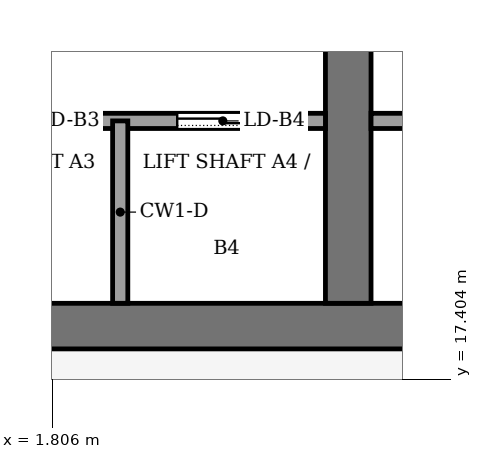
"""IFC4 building model, lengths in metres.
Left out: names, types, materials, properties, quantities, classifications, styles, units other than length and angle.
Written with IfcOpenShell. Run it as: python <this file> out.ifc"""

import sys

from ifc_helpers import new_model, si_unit, direction, frame, frame_2d, origin, place, context, subcontext, project, spatial, rectangle, extrude, element, fill, save


model = new_model("IFC4")
c1 = context("Model", 3, precision=1e-05, world=origin(), true_north=direction((0.0, 1.0)))
c2 = subcontext(c1, "Body", "Model", "MODEL_VIEW")
j1 = project(units=[si_unit("LENGTHUNIT", "METRE"), si_unit("PLANEANGLEUNIT", "RADIAN")], contexts=[c1])
p1 = place(None, origin())
s1 = spatial("IfcSite", under=j1, at=p1, CompositionType="ELEMENT")
p2 = place(p1, origin())
s2 = spatial("IfcBuilding", under=s1, at=p2, CompositionType="ELEMENT")
p3 = place(p2, frame((0.0, 0.0, 289.0)))
s3 = spatial("IfcBuildingStorey", under=s2, at=p3, CompositionType="ELEMENT", Elevation=289.0)
p4 = place(p3, frame((-13.2, 18.1, -0.13), z_axis=(0.0, 0.0, 1.0), x_axis=(1.0, 0.0, 0.0)))
e1 = element("IfcWall", 1, at=p4, inside=s3, PredefinedType="SHEAR", context=c2, shape_type="SweptSolid", body=[
    extrude(rectangle(XDim=26.4, YDim=0.6, at=frame_2d((13.2, 0.0))), origin(), (0.0, 0.0, 1.0), 5.0),
])
p5 = place(p3, frame((5.7, 18.4, -0.13), z_axis=(0.0, 0.0, 1.0), x_axis=(0.0, 1.0, 0.0)))
e2 = element("IfcWall", 2, at=p5, inside=s3, PredefinedType="SHEAR", context=c2, shape_type="SweptSolid", body=[
    extrude(rectangle(XDim=19.2, YDim=0.6, at=frame_2d((9.6, 0.0))), origin(), (0.0, 0.0, 1.0), 5.0),
])
p6 = place(p5, frame((13.3, 0.0, 0.13)))
e3 = element("IfcOpeningElement", 3, at=p6, cuts=e2, PredefinedType="OPENING", context=c2, shape_type="SweptSolid", body=[
    extrude(rectangle(XDim=2.4, YDim=2.4, at=frame_2d((1.2, 1.2))), frame((0.0, 0.31, 0.0), z_axis=(0.0, -1.0, 0.0), x_axis=(1.0, 0.0, 0.0)), (0.0, 0.0, 1.0), 0.62),
])
p7 = place(p3, frame((-5.4, 20.8, 0.0), z_axis=(0.0, 0.0, 1.0), x_axis=(1.0, 0.0, 0.0)))
e4 = element("IfcWall", 4, at=p7, inside=s3, PredefinedType="PARTITIONING", context=c2, shape_type="SweptSolid", body=[
    extrude(rectangle(XDim=10.8, YDim=0.2, at=frame_2d((5.4, 0.0))), origin(), (0.0, 0.0, 1.0), 4.87),
])
p8 = place(p7, frame((0.75, 0.0, 0.0)))
e5 = element("IfcOpeningElement", 5, at=p8, cuts=e4, PredefinedType="OPENING", context=c2, shape_type="SweptSolid", body=[
    extrude(rectangle(XDim=1.2, YDim=2.2, at=frame_2d((0.6, 1.1))), frame((0.0, 0.11, 0.0), z_axis=(0.0, -1.0, 0.0), x_axis=(1.0, 0.0, 0.0)), (0.0, 0.0, 1.0), 0.22),
])
p9 = place(p7, frame((3.45, 0.0, 0.0)))
e6 = element("IfcOpeningElement", 6, at=p9, cuts=e4, PredefinedType="OPENING", context=c2, shape_type="SweptSolid", body=[
    extrude(rectangle(XDim=1.2, YDim=2.2, at=frame_2d((0.6, 1.1))), frame((0.0, 0.11, 0.0), z_axis=(0.0, -1.0, 0.0), x_axis=(1.0, 0.0, 0.0)), (0.0, 0.0, 1.0), 0.22),
])
p10 = place(p7, frame((6.15, 0.0, 0.0)))
e7 = element("IfcOpeningElement", 7, at=p10, cuts=e4, PredefinedType="OPENING", context=c2, shape_type="SweptSolid", body=[
    extrude(rectangle(XDim=1.2, YDim=2.2, at=frame_2d((0.6, 1.1))), frame((0.0, 0.11, 0.0), z_axis=(0.0, -1.0, 0.0), x_axis=(1.0, 0.0, 0.0)), (0.0, 0.0, 1.0), 0.22),
])
p11 = place(p7, frame((8.85, 0.0, 0.0)))
e8 = element("IfcOpeningElement", 8, at=p11, cuts=e4, PredefinedType="OPENING", context=c2, shape_type="SweptSolid", body=[
    extrude(rectangle(XDim=1.2, YDim=2.2, at=frame_2d((0.6, 1.1))), frame((0.0, 0.11, 0.0), z_axis=(0.0, -1.0, 0.0), x_axis=(1.0, 0.0, 0.0)), (0.0, 0.0, 1.0), 0.22),
])
p12 = place(p3, frame((6.0, 20.8, 0.0), z_axis=(0.0, 0.0, 1.0), x_axis=(1.0, 0.0, 0.0)))
e9 = element("IfcWall", 9, at=p12, inside=s3, PredefinedType="PARTITIONING", context=c2, shape_type="SweptSolid", body=[
    extrude(rectangle(XDim=6.6, YDim=0.2, at=frame_2d((3.3, 0.0))), origin(), (0.0, 0.0, 1.0), 4.87),
])
p13 = place(p12, frame((1.15, 0.0, 0.0)))
e10 = element("IfcOpeningElement", 10, at=p13, cuts=e9, PredefinedType="OPENING", context=c2, shape_type="SweptSolid", body=[
    extrude(rectangle(XDim=1.0, YDim=2.1, at=frame_2d((0.5, 1.05))), frame((0.0, 0.11, 0.0), z_axis=(0.0, -1.0, 0.0), x_axis=(1.0, 0.0, 0.0)), (0.0, 0.0, 1.0), 0.22),
])
p14 = place(p12, frame((4.45, 0.0, 0.0)))
e11 = element("IfcOpeningElement", 11, at=p14, cuts=e9, PredefinedType="OPENING", context=c2, shape_type="SweptSolid", body=[
    extrude(rectangle(XDim=1.0, YDim=2.1, at=frame_2d((0.5, 1.05))), frame((0.0, 0.11, 0.0), z_axis=(0.0, -1.0, 0.0), x_axis=(1.0, 0.0, 0.0)), (0.0, 0.0, 1.0), 0.22),
])
p15 = place(p3, frame((2.7, 18.4, 0.0), z_axis=(0.0, 0.0, 1.0), x_axis=(0.0, 1.0, 0.0)))
e12 = element("IfcWall", 12, at=p15, inside=s3, PredefinedType="PARTITIONING", context=c2, shape_type="SweptSolid", body=[
    extrude(rectangle(XDim=2.4, YDim=0.2, at=frame_2d((1.2, 0.0))), origin(), (0.0, 0.0, 1.0), 4.87),
])
p16 = place(p10, origin())
e13 = element("IfcDoor", 13, at=p16, inside=s3, OperationType="SLIDING_TO_LEFT", PredefinedType="DOOR", context=c2, shape_type="SweptSolid", body=[
    extrude(rectangle(XDim=1.2, YDim=2.2, at=frame_2d((0.6, 1.1))), frame((0.0, 0.025, 0.0), z_axis=(0.0, -1.0, 0.0), x_axis=(1.0, 0.0, 0.0)), (0.0, 0.0, 1.0), 0.05),
])
fill(e7, e13)
p17 = place(p11, origin())
e14 = element("IfcDoor", 14, at=p17, inside=s3, OperationType="SLIDING_TO_LEFT", PredefinedType="DOOR", context=c2, shape_type="SweptSolid", body=[
    extrude(rectangle(XDim=1.2, YDim=2.2, at=frame_2d((0.6, 1.1))), frame((0.0, 0.025, 0.0), z_axis=(0.0, -1.0, 0.0), x_axis=(1.0, 0.0, 0.0)), (0.0, 0.0, 1.0), 0.05),
])
fill(e8, e14)
save(model, sys.argv[1])
